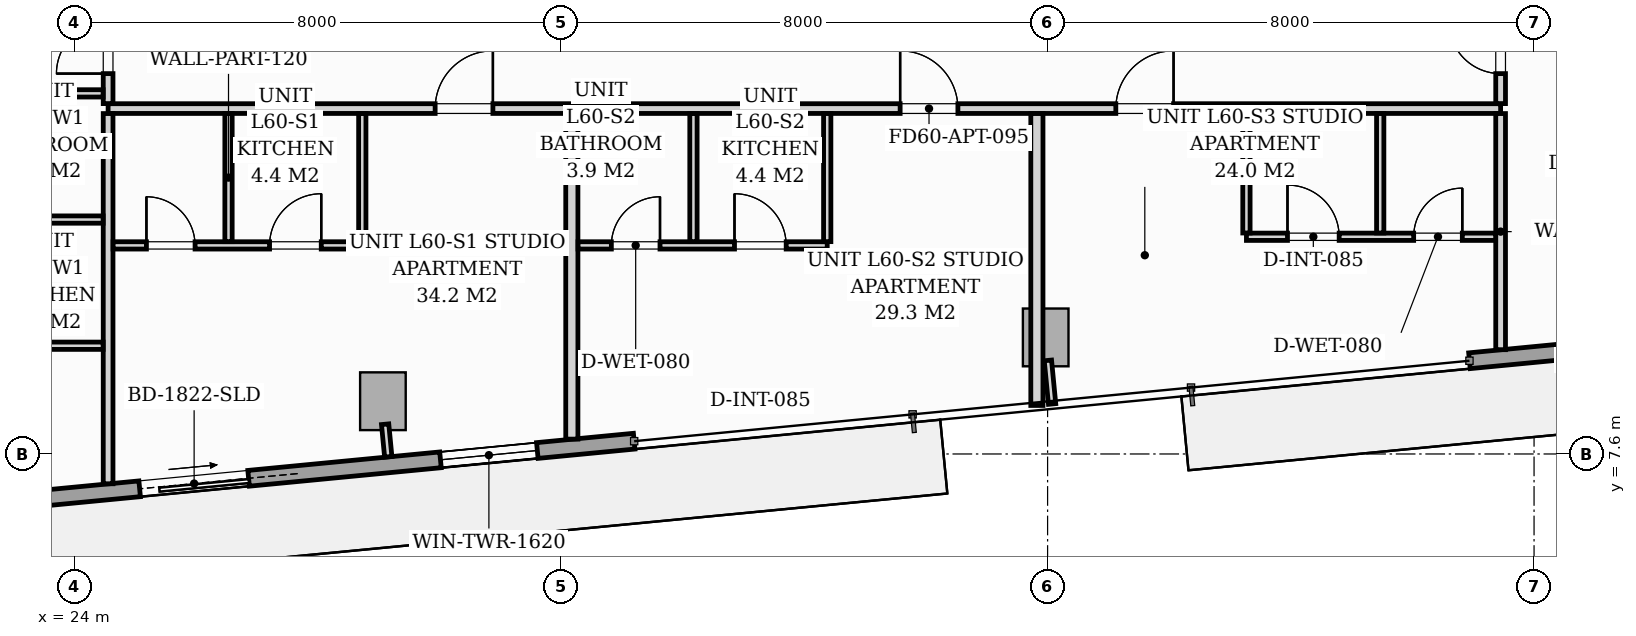
"""IFC4 building model, lengths in metres.
Left out: names, types, materials, properties, quantities, classifications, styles, units other than length and angle.
Written with IfcOpenShell. Run it as: python <this file> out.ifc"""

import sys

from ifc_helpers import new_model, si_unit, direction, frame, frame_2d, origin, origin_2d, place, context, subcontext, project, spatial, rectangle, extrude, source, transform, mapped, element, fill, save


model = new_model("IFC4")
c1 = context("Model", 3, precision=1e-05, world=origin(), true_north=direction((0.0, 1.0)))
c2 = subcontext(c1, "Body", "Model", "MODEL_VIEW")
j1 = project(units=[si_unit("LENGTHUNIT", "METRE"), si_unit("PLANEANGLEUNIT", "RADIAN")], contexts=[c1])
p1 = place(None, origin())
s1 = spatial("IfcSite", under=j1, at=p1, CompositionType="ELEMENT")
p2 = place(p1, origin())
s2 = spatial("IfcBuilding", under=s1, at=p2, CompositionType="ELEMENT")
p3 = place(p2, frame((0.0, 0.0, 208.2)))
s3 = spatial("IfcBuildingStorey", under=s2, at=p3, CompositionType="ELEMENT", Elevation=208.2)
m1 = source(origin(), c2, "Body", "SweptSolid", [
    extrude(rectangle(XDim=0.75, YDim=0.95, at=origin_2d()), origin(), (0.0, 0.0, 1.0), 3.194),
])
for number, where, z_axis, x_axis in (
    (1, (29.069, 8.467, 0.002), (0.0, 0.0, 1.0), (0.995, 0.096, 0.0)),
    (2, (39.969, 9.517, 0.002), (0.0, 0.0, 1.0), (0.995, 0.096, 0.0)),
):
    element("IfcColumn", number, at=place(p3, frame(where, z_axis=z_axis, x_axis=x_axis)), inside=s3, PredefinedType="COLUMN", context=c2, shape_type="MappedRepresentation", body=[
        mapped(m1, transform((0.0, 0.0, 0.0), scale=1.0)),
    ])
p4 = place(p3, frame((62.963, 10.676, 0.0), z_axis=(0.0, 0.0, 1.0), x_axis=(-0.995395627913, -0.095851676732, 0.0)))
e3 = element("IfcWall", 3, at=p4, inside=s3, PredefinedType="STANDARD", context=c2, shape_type="SweptSolid", body=[
    extrude(rectangle(XDim=16.1, YDim=0.26, at=frame_2d((8.05, 0.0))), origin(), (0.0, 0.0, 1.0), 2.9),
])
p5 = place(p4, frame((7.78, 0.0, 0.0)))
e4 = element("IfcOpeningElement", 4, at=p5, cuts=e3, PredefinedType="OPENING", context=c2, shape_type="SweptSolid", body=[
    extrude(rectangle(XDim=1.8, YDim=2.06, at=frame_2d((0.9, 1.03))), frame((0.0, 0.14, 0.0), z_axis=(0.0, -1.0, 0.0), x_axis=(1.0, 0.0, 0.0)), (0.0, 0.0, 1.0), 0.28),
])
p6 = place(p4, frame((2.05, 0.0, 0.65)))
e5 = element("IfcOpeningElement", 5, at=p6, cuts=e3, PredefinedType="OPENING", context=c2, shape_type="SweptSolid", body=[
    extrude(rectangle(XDim=1.6, YDim=1.5, at=frame_2d((0.8, 0.75))), frame((0.0, 0.14, 0.0), z_axis=(0.0, -1.0, 0.0), x_axis=(1.0, 0.0, 0.0)), (0.0, 0.0, 1.0), 0.28),
])
p7 = place(p3, frame((33.201, 7.81, 0.0), z_axis=(0.0, 0.0, 1.0), x_axis=(-0.995397074604, -0.095836652014, 0.0)))
e6 = element("IfcWall", 6, at=p7, inside=s3, PredefinedType="STANDARD", context=c2, shape_type="SweptSolid", body=[
    extrude(rectangle(XDim=16.1, YDim=0.26, at=frame_2d((8.05, 0.0))), origin(), (0.0, 0.0, 1.0), 2.9),
])
p8 = place(p7, frame((6.37, 0.0, 0.0)))
e7 = element("IfcOpeningElement", 7, at=p8, cuts=e6, PredefinedType="OPENING", context=c2, shape_type="SweptSolid", body=[
    extrude(rectangle(XDim=1.8, YDim=2.06, at=frame_2d((0.9, 1.03))), frame((0.0, 0.14, 0.0), z_axis=(0.0, -1.0, 0.0), x_axis=(1.0, 0.0, 0.0)), (0.0, 0.0, 1.0), 0.28),
])
p9 = place(p7, frame((1.6, 0.0, 0.65)))
e8 = element("IfcOpeningElement", 8, at=p9, cuts=e6, PredefinedType="OPENING", context=c2, shape_type="SweptSolid", body=[
    extrude(rectangle(XDim=1.6, YDim=1.5, at=frame_2d((0.8, 0.75))), frame((0.0, 0.14, 0.0), z_axis=(0.0, -1.0, 0.0), x_axis=(1.0, 0.0, 0.0)), (0.0, 0.0, 1.0), 0.28),
])
p10 = place(p3, frame((24.55, 13.28, 0.0), z_axis=(0.0, 0.0, 1.0), x_axis=(1.0, 0.0, 0.0)))
e9 = element("IfcWall", 9, at=p10, inside=s3, PredefinedType="PARTITIONING", context=c2, shape_type="SweptSolid", body=[
    extrude(rectangle(XDim=22.9, YDim=0.16, at=frame_2d((11.45, 0.0))), origin(), (0.0, 0.0, 1.0), 2.9),
])
p11 = place(p10, frame((5.378, 0.0, 0.0)))
e10 = element("IfcOpeningElement", 10, at=p11, cuts=e9, PredefinedType="OPENING", context=c2, shape_type="SweptSolid", body=[
    extrude(rectangle(XDim=0.95, YDim=2.06, at=frame_2d((0.475, 1.03))), frame((0.0, 0.09, 0.0), z_axis=(0.0, -1.0, 0.0), x_axis=(1.0, 0.0, 0.0)), (0.0, 0.0, 1.0), 0.18),
])
p12 = place(p10, frame((13.025, 0.0, 0.0)))
e11 = element("IfcOpeningElement", 11, at=p12, cuts=e9, PredefinedType="OPENING", context=c2, shape_type="SweptSolid", body=[
    extrude(rectangle(XDim=0.95, YDim=2.06, at=frame_2d((0.475, 1.03))), frame((0.0, 0.09, 0.0), z_axis=(0.0, -1.0, 0.0), x_axis=(1.0, 0.0, 0.0)), (0.0, 0.0, 1.0), 0.18),
])
p13 = place(p10, frame((16.572, 0.0, 0.0)))
e12 = element("IfcOpeningElement", 12, at=p13, cuts=e9, PredefinedType="OPENING", context=c2, shape_type="SweptSolid", body=[
    extrude(rectangle(XDim=0.95, YDim=2.06, at=frame_2d((0.475, 1.03))), frame((0.0, 0.09, 0.0), z_axis=(0.0, -1.0, 0.0), x_axis=(1.0, 0.0, 0.0)), (0.0, 0.0, 1.0), 0.18),
])
p14 = place(p3, frame((24.55, 7.11, 0.0), z_axis=(0.0, 0.0, 1.0), x_axis=(0.0, 1.0, 0.0)))
e13 = element("IfcWall", 13, at=p14, inside=s3, PredefinedType="PARTITIONING", context=c2, shape_type="SweptSolid", body=[
    extrude(rectangle(XDim=6.088, YDim=0.16, at=frame_2d((3.044, 0.0))), origin(), (0.0, 0.0, 1.0), 2.9),
])
p15 = place(p3, frame((24.55, 13.362, 0.0), z_axis=(0.0, 0.0, 1.0), x_axis=(0.0, 1.0, 0.0)))
e14 = element("IfcWall", 14, at=p15, inside=s3, PredefinedType="PARTITIONING", context=c2, shape_type="SweptSolid", body=[
    extrude(rectangle(XDim=7.288, YDim=0.16, at=frame_2d((3.644, 0.0))), origin(), (0.0, 0.0, 1.0), 2.9),
])
p16 = place(p15, frame((0.493, 0.0, 0.0)))
e15 = element("IfcOpeningElement", 15, at=p16, cuts=e14, PredefinedType="OPENING", context=c2, shape_type="SweptSolid", body=[
    extrude(rectangle(XDim=0.85, YDim=2.0, at=frame_2d((0.425, 1.0))), frame((0.0, 0.09, 0.0), z_axis=(0.0, -1.0, 0.0), x_axis=(1.0, 0.0, 0.0)), (0.0, 0.0, 1.0), 0.18),
])
p17 = place(p15, frame((5.623, 0.0, 0.0)))
e16 = element("IfcOpeningElement", 16, at=p17, cuts=e14, PredefinedType="OPENING", context=c2, shape_type="SweptSolid", body=[
    extrude(rectangle(XDim=0.95, YDim=2.06, at=frame_2d((0.475, 1.03))), frame((0.0, 0.09, 0.0), z_axis=(0.0, -1.0, 0.0), x_axis=(1.0, 0.0, 0.0)), (0.0, 0.0, 1.0), 0.18),
])
p18 = place(p3, frame((47.45, 9.315, 0.0), z_axis=(0.0, 0.0, 1.0), x_axis=(0.0, 1.0, 0.0)))
e17 = element("IfcWall", 17, at=p18, inside=s3, PredefinedType="PARTITIONING", context=c2, shape_type="SweptSolid", body=[
    extrude(rectangle(XDim=3.883, YDim=0.16, at=frame_2d((1.941, 0.0))), origin(), (0.0, 0.0, 1.0), 2.9),
])
p19 = place(p3, frame((47.45, 13.362, 0.0), z_axis=(0.0, 0.0, 1.0), x_axis=(0.0, 1.0, 0.0)))
e18 = element("IfcWall", 18, at=p19, inside=s3, PredefinedType="PARTITIONING", context=c2, shape_type="SweptSolid", body=[
    extrude(rectangle(XDim=7.288, YDim=0.16, at=frame_2d((3.644, 0.0))), origin(), (0.0, 0.0, 1.0), 2.9),
])
p20 = place(p19, frame((0.493, 0.0, 0.0)))
e19 = element("IfcOpeningElement", 19, at=p20, cuts=e18, PredefinedType="OPENING", context=c2, shape_type="SweptSolid", body=[
    extrude(rectangle(XDim=0.85, YDim=2.0, at=frame_2d((0.425, 1.0))), frame((0.0, 0.09, 0.0), z_axis=(0.0, -1.0, 0.0), x_axis=(1.0, 0.0, 0.0)), (0.0, 0.0, 1.0), 0.18),
])
p21 = place(p19, frame((5.681, 0.0, 0.0)))
e20 = element("IfcOpeningElement", 20, at=p21, cuts=e18, PredefinedType="OPENING", context=c2, shape_type="SweptSolid", body=[
    extrude(rectangle(XDim=0.95, YDim=2.06, at=frame_2d((0.475, 1.03))), frame((0.0, 0.09, 0.0), z_axis=(0.0, -1.0, 0.0), x_axis=(1.0, 0.0, 0.0)), (0.0, 0.0, 1.0), 0.18),
])
p22 = place(p3, frame((24.632, 11.03, 0.0), z_axis=(0.0, 0.0, 1.0), x_axis=(1.0, 0.0, 0.0)))
e21 = element("IfcWall", 21, at=p22, inside=s3, PredefinedType="PARTITIONING", context=c2, shape_type="SweptSolid", body=[
    extrude(rectangle(XDim=4.098, YDim=0.12, at=frame_2d((2.049, 0.0))), origin(), (0.0, 0.0, 1.0), 2.9),
])
p23 = place(p22, frame((0.548, 0.0, 0.0)))
e22 = element("IfcOpeningElement", 22, at=p23, cuts=e21, PredefinedType="OPENING", context=c2, shape_type="SweptSolid", body=[
    extrude(rectangle(XDim=0.8, YDim=2.02, at=frame_2d((0.4, 1.01))), frame((0.0, 0.07, 0.0), z_axis=(0.0, -1.0, 0.0), x_axis=(1.0, 0.0, 0.0)), (0.0, 0.0, 1.0), 0.14),
])
p24 = place(p22, frame((2.573, 0.0, 0.0)))
e23 = element("IfcOpeningElement", 23, at=p24, cuts=e21, PredefinedType="OPENING", context=c2, shape_type="SweptSolid", body=[
    extrude(rectangle(XDim=0.85, YDim=2.05, at=frame_2d((0.425, 1.025))), frame((0.0, 0.07, 0.0), z_axis=(0.0, -1.0, 0.0), x_axis=(1.0, 0.0, 0.0)), (0.0, 0.0, 1.0), 0.14),
])
for number, where, z_axis, x_axis in (
    (24, (28.73, 11.092, 0.0), (0.0, 0.0, 1.0), (0.0, 1.0, 0.0)),
    (25, (26.53, 11.092, 0.0), (0.0, 0.0, 1.0), (0.0, 1.0, 0.0)),
):
    element("IfcWall", number, at=place(p3, frame(where, z_axis=z_axis, x_axis=x_axis)), inside=s3, PredefinedType="PARTITIONING", context=c2, shape_type="SweptSolid", body=[
        extrude(rectangle(XDim=2.106, YDim=0.12, at=frame_2d((1.053, 0.0))), origin(), (0.0, 0.0, 1.0), 2.9),
    ])
p25 = place(p3, frame((32.176, 7.844, 0.0), z_axis=(0.0, 0.0, 1.0), x_axis=(0.0, 1.0, 0.0)))
e26 = element("IfcWall", 26, at=p25, inside=s3, PredefinedType="PARTITIONING", context=c2, shape_type="SweptSolid", body=[
    extrude(rectangle(XDim=5.354, YDim=0.2, at=frame_2d((2.677, 0.0))), origin(), (0.0, 0.0, 1.0), 2.9),
])
p26 = place(p3, frame((32.278, 11.03, 0.0), z_axis=(0.0, 0.0, 1.0), x_axis=(1.0, 0.0, 0.0)))
e27 = element("IfcWall", 27, at=p26, inside=s3, PredefinedType="PARTITIONING", context=c2, shape_type="SweptSolid", body=[
    extrude(rectangle(XDim=4.098, YDim=0.12, at=frame_2d((2.049, 0.0))), origin(), (0.0, 0.0, 1.0), 2.9),
])
p27 = place(p26, frame((0.548, 0.0, 0.0)))
e28 = element("IfcOpeningElement", 28, at=p27, cuts=e27, PredefinedType="OPENING", context=c2, shape_type="SweptSolid", body=[
    extrude(rectangle(XDim=0.8, YDim=2.02, at=frame_2d((0.4, 1.01))), frame((0.0, 0.07, 0.0), z_axis=(0.0, -1.0, 0.0), x_axis=(1.0, 0.0, 0.0)), (0.0, 0.0, 1.0), 0.14),
])
p28 = place(p26, frame((2.573, 0.0, 0.0)))
e29 = element("IfcOpeningElement", 29, at=p28, cuts=e27, PredefinedType="OPENING", context=c2, shape_type="SweptSolid", body=[
    extrude(rectangle(XDim=0.85, YDim=2.05, at=frame_2d((0.425, 1.025))), frame((0.0, 0.07, 0.0), z_axis=(0.0, -1.0, 0.0), x_axis=(1.0, 0.0, 0.0)), (0.0, 0.0, 1.0), 0.14),
])
for number, where, z_axis, x_axis in (
    (30, (36.376, 11.092, 0.0), (0.0, 0.0, 1.0), (0.0, 1.0, 0.0)),
    (31, (34.176, 11.092, 0.0), (0.0, 0.0, 1.0), (0.0, 1.0, 0.0)),
):
    element("IfcWall", number, at=place(p3, frame(where, z_axis=z_axis, x_axis=x_axis)), inside=s3, PredefinedType="PARTITIONING", context=c2, shape_type="SweptSolid", body=[
        extrude(rectangle(XDim=2.106, YDim=0.12, at=frame_2d((1.053, 0.0))), origin(), (0.0, 0.0, 1.0), 2.9),
    ])
p29 = place(p3, frame((39.824, 8.398, 0.0), z_axis=(0.0, 0.0, 1.0), x_axis=(0.0, 1.0, 0.0)))
e32 = element("IfcWall", 32, at=p29, inside=s3, PredefinedType="PARTITIONING", context=c2, shape_type="SweptSolid", body=[
    extrude(rectangle(XDim=4.8, YDim=0.2, at=frame_2d((2.4, 0.0))), origin(), (0.0, 0.0, 1.0), 2.9),
])
p30 = place(p3, frame((43.27, 11.172, 0.0), z_axis=(0.0, 0.0, 1.0), x_axis=(1.0, 0.0, 0.0)))
e33 = element("IfcWall", 33, at=p30, inside=s3, PredefinedType="PARTITIONING", context=c2, shape_type="SweptSolid", body=[
    extrude(rectangle(XDim=4.098, YDim=0.12, at=frame_2d((2.049, 0.0))), origin(), (0.0, 0.0, 1.0), 2.9),
])
p31 = place(p30, frame((0.675, 0.0, 0.0)))
e34 = element("IfcOpeningElement", 34, at=p31, cuts=e33, PredefinedType="OPENING", context=c2, shape_type="SweptSolid", body=[
    extrude(rectangle(XDim=0.85, YDim=2.05, at=frame_2d((0.425, 1.025))), frame((0.0, 0.07, 0.0), z_axis=(0.0, -1.0, 0.0), x_axis=(1.0, 0.0, 0.0)), (0.0, 0.0, 1.0), 0.14),
])
p32 = place(p30, frame((2.75, 0.0, 0.0)))
e35 = element("IfcOpeningElement", 35, at=p32, cuts=e33, PredefinedType="OPENING", context=c2, shape_type="SweptSolid", body=[
    extrude(rectangle(XDim=0.8, YDim=2.02, at=frame_2d((0.4, 1.01))), frame((0.0, 0.07, 0.0), z_axis=(0.0, -1.0, 0.0), x_axis=(1.0, 0.0, 0.0)), (0.0, 0.0, 1.0), 0.14),
])
for number, where, z_axis, x_axis in (
    (36, (43.27, 11.234, 0.0), (0.0, 0.0, 1.0), (0.0, 1.0, 0.0)),
    (37, (45.47, 11.234, 0.0), (0.0, 0.0, 1.0), (0.0, 1.0, 0.0)),
):
    element("IfcWall", number, at=place(p3, frame(where, z_axis=z_axis, x_axis=x_axis)), inside=s3, PredefinedType="PARTITIONING", context=c2, shape_type="SweptSolid", body=[
        extrude(rectangle(XDim=1.964, YDim=0.12, at=frame_2d((0.982, 0.0))), origin(), (0.0, 0.0, 1.0), 2.9),
    ])
for number, where, z_axis, x_axis in (
    (38, (22.212, 11.455, 0.0), (0.0, 0.0, 1.0), (1.0, 0.0, 0.0)),
    (39, (22.212, 9.38, 0.0), (0.0, 0.0, 1.0), (1.0, 0.0, 0.0)),
    (40, (22.212, 13.53, 0.0), (0.0, 0.0, 1.0), (1.0, 0.0, 0.0)),
):
    element("IfcWall", number, at=place(p3, frame(where, z_axis=z_axis, x_axis=x_axis)), inside=s3, PredefinedType="PARTITIONING", context=c2, shape_type="SweptSolid", body=[
        extrude(rectangle(XDim=2.256, YDim=0.12, at=frame_2d((1.128, 0.0))), origin(), (0.0, 0.0, 1.0), 2.9),
    ])
p33 = place(p3, frame((29.105, 8.089, 0.0), z_axis=(0.0, 0.0, 1.0), x_axis=(0.095772948675, -0.995403205893, 0.0)))
e41 = element("IfcWall", 41, at=p33, inside=s3, PredefinedType="PARTITIONING", context=c2, shape_type="SweptSolid", body=[
    extrude(rectangle(XDim=0.538, YDim=0.12, at=frame_2d((0.269, 0.0))), origin(), (0.0, 0.0, 1.0), 2.9),
])
p34 = place(p3, frame((40.005, 9.139, 0.0), z_axis=(0.0, 0.0, 1.0), x_axis=(0.095977354523, -0.995383517755, 0.0)))
e42 = element("IfcWall", 42, at=p34, inside=s3, PredefinedType="PARTITIONING", context=c2, shape_type="SweptSolid", body=[
    extrude(rectangle(XDim=0.72, YDim=0.12, at=frame_2d((0.36, 0.0))), origin(), (0.0, 0.0, 1.0), 2.9),
])
m2 = source(origin(), c2, "Body", "SweptSolid", [
    extrude(rectangle(XDim=1.8, YDim=2.06, at=frame_2d((0.9, 1.03))), frame((0.0, 0.025, 0.0), z_axis=(0.0, -1.0, 0.0), x_axis=(1.0, 0.0, 0.0)), (0.0, 0.0, 1.0), 0.05),
])
p35 = place(p8, origin())
e43 = element("IfcDoor", 43, at=p35, inside=s3, OperationType="SLIDING_TO_LEFT", PredefinedType="DOOR", context=c2, shape_type="MappedRepresentation", body=[
    mapped(m2, transform((0.0, 0.0, 0.0), scale=1.0)),
])
fill(e7, e43)
m3 = source(origin(), c2, "Body", "SweptSolid", [
    extrude(rectangle(XDim=1.6, YDim=1.5, at=frame_2d((0.8, 0.75))), frame((0.0, 0.03, 0.0), z_axis=(0.0, -1.0, 0.0), x_axis=(1.0, 0.0, 0.0)), (0.0, 0.0, 1.0), 0.06),
])
p36 = place(p9, origin())
e44 = element("IfcWindow", 44, at=p36, inside=s3, PartitioningType="SINGLE_PANEL", PredefinedType="WINDOW", context=c2, shape_type="MappedRepresentation", body=[
    mapped(m3, transform((0.0, 0.0, 0.0), scale=1.0)),
])
fill(e8, e44)
m4 = source(origin(), c2, "Body", "SweptSolid", [
    extrude(rectangle(XDim=0.95, YDim=2.06, at=frame_2d((0.475, 1.03))), frame((0.0, 0.025, 0.0), z_axis=(0.0, -1.0, 0.0), x_axis=(1.0, 0.0, 0.0)), (0.0, 0.0, 1.0), 0.05),
])
p37 = place(p11, origin())
e45 = element("IfcDoor", 45, at=p37, inside=s3, OperationType="SINGLE_SWING_RIGHT", PredefinedType="DOOR", context=c2, shape_type="MappedRepresentation", body=[
    mapped(m4, transform((0.0, 0.0, 0.0), scale=1.0)),
])
fill(e10, e45)
m5 = source(origin(), c2, "Body", "SweptSolid", [
    extrude(rectangle(XDim=0.8, YDim=2.02, at=frame_2d((0.4, 1.01))), frame((0.0, 0.025, 0.0), z_axis=(0.0, -1.0, 0.0), x_axis=(1.0, 0.0, 0.0)), (0.0, 0.0, 1.0), 0.05),
])
p38 = place(p23, origin())
e46 = element("IfcDoor", 46, at=p38, inside=s3, OperationType="SINGLE_SWING_LEFT", PredefinedType="DOOR", context=c2, shape_type="MappedRepresentation", body=[
    mapped(m5, transform((0.0, 0.0, 0.0), scale=1.0)),
])
fill(e22, e46)
m6 = source(origin(), c2, "Body", "SweptSolid", [
    extrude(rectangle(XDim=0.85, YDim=2.05, at=frame_2d((0.425, 1.025))), frame((0.0, 0.025, 0.0), z_axis=(0.0, -1.0, 0.0), x_axis=(1.0, 0.0, 0.0)), (0.0, 0.0, 1.0), 0.05),
])
p39 = place(p24, origin())
e47 = element("IfcDoor", 47, at=p39, inside=s3, OperationType="SINGLE_SWING_RIGHT", PredefinedType="DOOR", context=c2, shape_type="MappedRepresentation", body=[
    mapped(m6, transform((0.0, 0.0, 0.0), scale=1.0)),
])
fill(e23, e47)
p40 = place(p12, origin())
e48 = element("IfcDoor", 48, at=p40, inside=s3, OperationType="SINGLE_SWING_LEFT", PredefinedType="DOOR", context=c2, shape_type="MappedRepresentation", body=[
    mapped(m4, transform((0.0, 0.0, 0.0), scale=1.0)),
])
fill(e11, e48)
p41 = place(p27, origin())
e49 = element("IfcDoor", 49, at=p41, inside=s3, OperationType="SINGLE_SWING_RIGHT", PredefinedType="DOOR", context=c2, shape_type="MappedRepresentation", body=[
    mapped(m5, transform((0.0, 0.0, 0.0), scale=1.0)),
])
fill(e28, e49)
p42 = place(p28, origin())
e50 = element("IfcDoor", 50, at=p42, inside=s3, OperationType="SINGLE_SWING_LEFT", PredefinedType="DOOR", context=c2, shape_type="MappedRepresentation", body=[
    mapped(m6, transform((0.0, 0.0, 0.0), scale=1.0)),
])
fill(e29, e50)
p43 = place(p13, origin())
e51 = element("IfcDoor", 51, at=p43, inside=s3, OperationType="SINGLE_SWING_RIGHT", PredefinedType="DOOR", context=c2, shape_type="MappedRepresentation", body=[
    mapped(m4, transform((0.0, 0.0, 0.0), scale=1.0)),
])
fill(e12, e51)
p44 = place(p31, origin())
e52 = element("IfcDoor", 52, at=p44, inside=s3, OperationType="SINGLE_SWING_LEFT", PredefinedType="DOOR", context=c2, shape_type="MappedRepresentation", body=[
    mapped(m6, transform((0.0, 0.0, 0.0), scale=1.0)),
])
fill(e34, e52)
p45 = place(p32, origin())
e53 = element("IfcDoor", 53, at=p45, inside=s3, OperationType="SINGLE_SWING_RIGHT", PredefinedType="DOOR", context=c2, shape_type="MappedRepresentation", body=[
    mapped(m5, transform((0.0, 0.0, 0.0), scale=1.0)),
])
fill(e35, e53)
m7 = source(origin(), c2, "Body", "SweptSolid", [
    extrude(rectangle(XDim=0.85, YDim=2.0, at=frame_2d((0.425, 1.0))), frame((0.0, 0.025, 0.0), z_axis=(0.0, -1.0, 0.0), x_axis=(1.0, 0.0, 0.0)), (0.0, 0.0, 1.0), 0.05),
])
p46 = place(p16, origin())
e54 = element("IfcDoor", 54, at=p46, inside=s3, OperationType="SINGLE_SWING_LEFT", PredefinedType="DOOR", context=c2, shape_type="MappedRepresentation", body=[
    mapped(m7, transform((0.0, 0.0, 0.0), scale=1.0)),
])
fill(e15, e54)
p47 = place(p20, origin())
e55 = element("IfcDoor", 55, at=p47, inside=s3, OperationType="SINGLE_SWING_RIGHT", PredefinedType="DOOR", context=c2, shape_type="MappedRepresentation", body=[
    mapped(m7, transform((0.0, 0.0, 0.0), scale=1.0)),
])
fill(e19, e55)
save(model, sys.argv[1])
